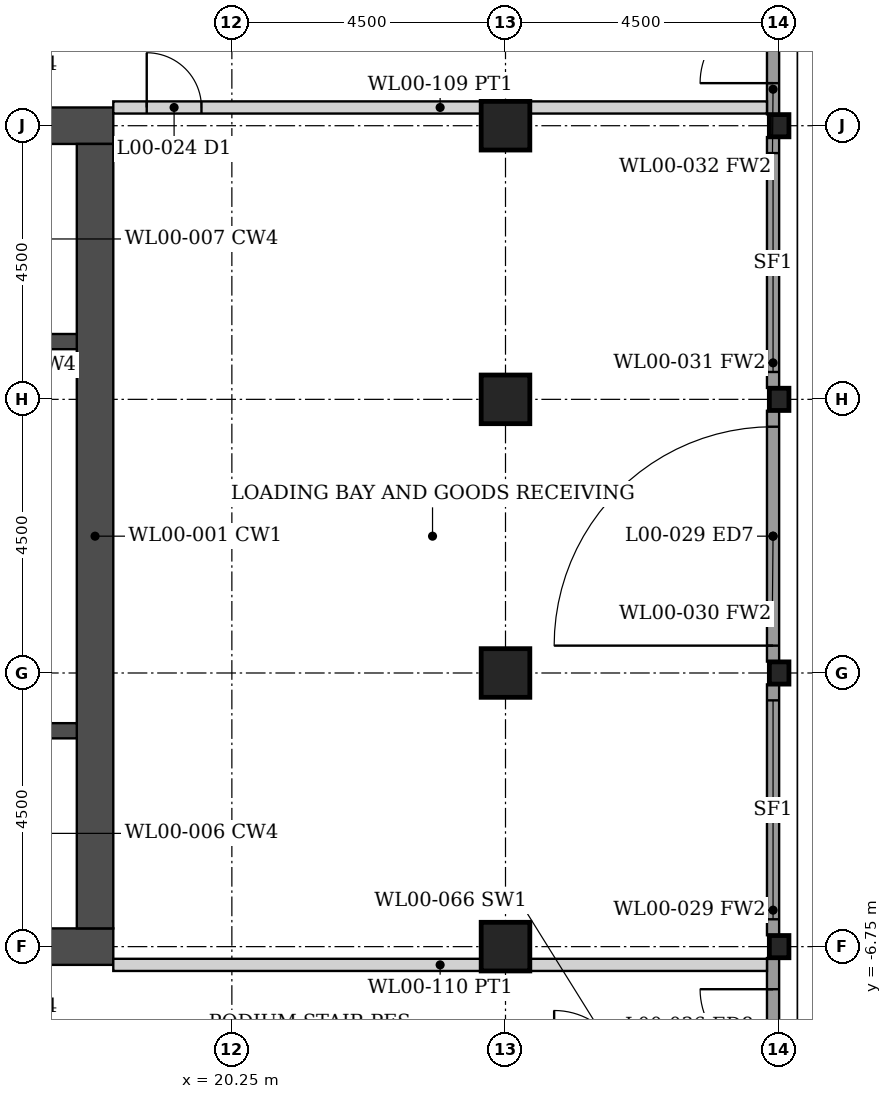
"""IFC4 building model, lengths in metres.
Left out: names, types, materials, properties, quantities, classifications, styles, units other than length and angle.
Written with IfcOpenShell. Run it as: python <this file> out.ifc"""

import sys

from ifc_helpers import new_model, si_unit, direction, frame, frame_2d, origin, origin_2d, place, context, subcontext, project, spatial, rectangle, hollow_rectangle, i_section, extrude, element, fill, save


model = new_model("IFC4")
c1 = context("Model", 3, precision=1e-05, world=origin(), true_north=direction((0.0, 1.0)))
c2 = subcontext(c1, "Body", "Model", "MODEL_VIEW")
j1 = project(units=[si_unit("LENGTHUNIT", "METRE"), si_unit("PLANEANGLEUNIT", "RADIAN")], contexts=[c1])
p1 = place(None, origin())
s1 = spatial("IfcSite", under=j1, at=p1, CompositionType="ELEMENT")
p2 = place(p1, origin())
s2 = spatial("IfcBuilding", under=s1, at=p2, CompositionType="ELEMENT")
p3 = place(p2, origin())
s3 = spatial("IfcBuildingStorey", under=s2, at=p3, CompositionType="ELEMENT", Elevation=0.0)
for number, where, z_axis, x_axis in (
    (1, (24.75, -6.75, -0.3), (0.0, 0.0, 1.0), (1.0, 0.0, 0.0)),
    (2, (24.75, -2.25, -0.3), (0.0, 0.0, 1.0), (1.0, 0.0, 0.0)),
    (3, (24.75, 2.25, -0.3), (0.0, 0.0, 1.0), (1.0, 0.0, 0.0)),
    (4, (24.75, 6.75, -0.3), (0.0, 0.0, 1.0), (1.0, 0.0, 0.0)),
):
    element("IfcColumn", number, at=place(p3, frame(where, z_axis=z_axis, x_axis=x_axis)), inside=s3, PredefinedType="COLUMN", context=c2, shape_type="SweptSolid", body=[
        extrude(hollow_rectangle(XDim=0.8, YDim=0.8, WallThickness=0.08, at=origin_2d()), origin(), (0.0, 0.0, 1.0), 6.3),
    ])
for number, where, z_axis, x_axis in (
    (5, (29.25, -6.75, -0.3), (0.0, 0.0, 1.0), (1.0, 0.0, 0.0)),
    (6, (29.25, -2.25, -0.3), (0.0, 0.0, 1.0), (1.0, 0.0, 0.0)),
    (7, (29.25, 2.25, -0.3), (0.0, 0.0, 1.0), (1.0, 0.0, 0.0)),
    (8, (29.25, 6.75, -0.3), (0.0, 0.0, 1.0), (1.0, 0.0, 0.0)),
):
    element("IfcColumn", number, at=place(p3, frame(where, z_axis=z_axis, x_axis=x_axis)), inside=s3, PredefinedType="COLUMN", context=c2, shape_type="SweptSolid", body=[
        extrude(i_section(OverallWidth=0.322, OverallDepth=0.365, WebThickness=0.027, FlangeThickness=0.044, FilletRadius=0.015, at=origin_2d()), origin(), (0.0, 0.0, 1.0), 6.3),
    ])
for number, where, z_axis, x_axis in (
    (9, (8.7, -6.75, 0.0), (0.0, 0.0, 1.0), (1.0, 0.0, 0.0)),
    (10, (8.7, 6.75, 0.0), (0.0, 0.0, 1.0), (1.0, 0.0, 0.0)),
):
    element("IfcWall", number, at=place(p3, frame(where, z_axis=z_axis, x_axis=x_axis)), inside=s3, PredefinedType="SHEAR", context=c2, shape_type="SweptSolid", body=[
        extrude(rectangle(XDim=9.6, YDim=0.6, at=frame_2d((4.8, 0.0))), origin(), (0.0, 0.0, 1.0), 6.0),
    ])
p4 = place(p3, frame((18.0, -6.45, 0.0), z_axis=(0.0, 0.0, 1.0), x_axis=(0.0, 1.0, 0.0)))
e11 = element("IfcWall", 11, at=p4, inside=s3, PredefinedType="SHEAR", context=c2, shape_type="SweptSolid", body=[
    extrude(rectangle(XDim=12.9, YDim=0.6, at=frame_2d((6.45, 0.0))), origin(), (0.0, 0.0, 1.0), 6.0),
])
p5 = place(p3, frame((9.3, -3.2, 0.0), z_axis=(0.0, 0.0, 1.0), x_axis=(1.0, 0.0, 0.0)))
e12 = element("IfcWall", 12, at=p5, inside=s3, PredefinedType="SHEAR", context=c2, shape_type="SweptSolid", body=[
    extrude(rectangle(XDim=8.4, YDim=0.25, at=frame_2d((4.2, 0.0))), origin(), (0.0, 0.0, 1.0), 6.0),
])
p6 = place(p5, frame((0.15, 0.0, 0.0)))
e13 = element("IfcOpeningElement", 13, at=p6, cuts=e12, PredefinedType="OPENING", context=c2, shape_type="SweptSolid", body=[
    extrude(rectangle(XDim=1.0, YDim=2.1, at=frame_2d((0.5, 1.05))), frame((0.0, 0.135, 0.0), z_axis=(0.0, -1.0, 0.0), x_axis=(1.0, 0.0, 0.0)), (0.0, 0.0, 1.0), 0.27),
])
p7 = place(p3, frame((9.3, 3.2, 0.0), z_axis=(0.0, 0.0, 1.0), x_axis=(1.0, 0.0, 0.0)))
e14 = element("IfcWall", 14, at=p7, inside=s3, PredefinedType="SHEAR", context=c2, shape_type="SweptSolid", body=[
    extrude(rectangle(XDim=8.4, YDim=0.25, at=frame_2d((4.2, 0.0))), origin(), (0.0, 0.0, 1.0), 6.0),
])
p8 = place(p3, frame((29.15, -11.062, 0.0), z_axis=(0.0, 0.0, 1.0), x_axis=(0.0, 1.0, 0.0)))
e15 = element("IfcWall", 15, at=p8, inside=s3, PredefinedType="SOLIDWALL", context=c2, shape_type="SweptSolid", body=[
    extrude(rectangle(XDim=4.125, YDim=0.2, at=frame_2d((2.062, 0.0))), origin(), (0.0, 0.0, 1.0), 5.133),
])
p9 = place(p8, frame((2.412, 0.0, 0.0)))
e16 = element("IfcOpeningElement", 16, at=p9, cuts=e15, PredefinedType="OPENING", context=c2, shape_type="SweptSolid", body=[
    extrude(rectangle(XDim=1.2, YDim=2.4, at=frame_2d((0.6, 1.2))), frame((0.0, 0.11, 0.0), z_axis=(0.0, -1.0, 0.0), x_axis=(1.0, 0.0, 0.0)), (0.0, 0.0, 1.0), 0.22),
])
p10 = place(p8, frame((0.012, 0.0, 0.15)))
e17 = element("IfcOpeningElement", 17, at=p10, cuts=e15, PredefinedType="OPENING", context=c2, shape_type="SweptSolid", body=[
    extrude(rectangle(XDim=1.6, YDim=4.833, at=frame_2d((0.8, 2.417))), frame((0.0, 0.11, 0.0), z_axis=(0.0, -1.0, 0.0), x_axis=(1.0, 0.0, 0.0)), (0.0, 0.0, 1.0), 0.22),
])
p11 = place(p3, frame((29.15, -6.562, 0.0), z_axis=(0.0, 0.0, 1.0), x_axis=(0.0, 1.0, 0.0)))
e18 = element("IfcWall", 18, at=p11, inside=s3, PredefinedType="SOLIDWALL", context=c2, shape_type="SweptSolid", body=[
    extrude(rectangle(XDim=4.125, YDim=0.2, at=frame_2d((2.062, 0.0))), origin(), (0.0, 0.0, 1.0), 5.133),
])
p12 = place(p11, frame((0.262, 0.0, 0.15)))
e19 = element("IfcOpeningElement", 19, at=p12, cuts=e18, PredefinedType="OPENING", context=c2, shape_type="SweptSolid", body=[
    extrude(rectangle(XDim=3.6, YDim=4.833, at=frame_2d((1.8, 2.417))), frame((0.0, 0.11, 0.0), z_axis=(0.0, -1.0, 0.0), x_axis=(1.0, 0.0, 0.0)), (0.0, 0.0, 1.0), 0.22),
])
p13 = place(p3, frame((29.15, -2.062, 0.0), z_axis=(0.0, 0.0, 1.0), x_axis=(0.0, 1.0, 0.0)))
e20 = element("IfcWall", 20, at=p13, inside=s3, PredefinedType="SOLIDWALL", context=c2, shape_type="SweptSolid", body=[
    extrude(rectangle(XDim=4.125, YDim=0.2, at=frame_2d((2.062, 0.0))), origin(), (0.0, 0.0, 1.0), 5.133),
])
p14 = place(p13, frame((0.262, 0.0, 0.0)))
e21 = element("IfcOpeningElement", 21, at=p14, cuts=e20, PredefinedType="OPENING", context=c2, shape_type="SweptSolid", body=[
    extrude(rectangle(XDim=3.6, YDim=4.5, at=frame_2d((1.8, 2.25))), frame((0.0, 0.11, 0.0), z_axis=(0.0, -1.0, 0.0), x_axis=(1.0, 0.0, 0.0)), (0.0, 0.0, 1.0), 0.22),
])
p15 = place(p3, frame((29.15, 2.438, 0.0), z_axis=(0.0, 0.0, 1.0), x_axis=(0.0, 1.0, 0.0)))
e22 = element("IfcWall", 22, at=p15, inside=s3, PredefinedType="SOLIDWALL", context=c2, shape_type="SweptSolid", body=[
    extrude(rectangle(XDim=4.125, YDim=0.2, at=frame_2d((2.062, 0.0))), origin(), (0.0, 0.0, 1.0), 5.133),
])
p16 = place(p15, frame((0.262, 0.0, 0.15)))
e23 = element("IfcOpeningElement", 23, at=p16, cuts=e22, PredefinedType="OPENING", context=c2, shape_type="SweptSolid", body=[
    extrude(rectangle(XDim=3.6, YDim=4.833, at=frame_2d((1.8, 2.417))), frame((0.0, 0.11, 0.0), z_axis=(0.0, -1.0, 0.0), x_axis=(1.0, 0.0, 0.0)), (0.0, 0.0, 1.0), 0.22),
])
p17 = place(p3, frame((29.15, 6.938, 0.0), z_axis=(0.0, 0.0, 1.0), x_axis=(0.0, 1.0, 0.0)))
e24 = element("IfcWall", 24, at=p17, inside=s3, PredefinedType="SOLIDWALL", context=c2, shape_type="SweptSolid", body=[
    extrude(rectangle(XDim=4.125, YDim=0.2, at=frame_2d((2.062, 0.0))), origin(), (0.0, 0.0, 1.0), 5.133),
])
p18 = place(p17, frame((0.512, 0.0, 0.0)))
e25 = element("IfcOpeningElement", 25, at=p18, cuts=e24, PredefinedType="OPENING", context=c2, shape_type="SweptSolid", body=[
    extrude(rectangle(XDim=1.2, YDim=2.4, at=frame_2d((0.6, 1.2))), frame((0.0, 0.11, 0.0), z_axis=(0.0, -1.0, 0.0), x_axis=(1.0, 0.0, 0.0)), (0.0, 0.0, 1.0), 0.22),
])
p19 = place(p17, frame((2.512, 0.0, 0.15)))
e26 = element("IfcOpeningElement", 26, at=p19, cuts=e24, PredefinedType="OPENING", context=c2, shape_type="SweptSolid", body=[
    extrude(rectangle(XDim=1.6, YDim=4.833, at=frame_2d((0.8, 2.417))), frame((0.0, 0.11, 0.0), z_axis=(0.0, -1.0, 0.0), x_axis=(1.0, 0.0, 0.0)), (0.0, 0.0, 1.0), 0.22),
])
p20 = place(p3, frame((18.3, 7.05, 0.0), z_axis=(0.0, 0.0, 1.0), x_axis=(1.0, 0.0, 0.0)))
e27 = element("IfcWall", 27, at=p20, inside=s3, PredefinedType="PARTITIONING", context=c2, shape_type="SweptSolid", body=[
    extrude(rectangle(XDim=10.75, YDim=0.2, at=frame_2d((5.375, 0.0))), origin(), (0.0, 0.0, 1.0), 4.829),
])
p21 = place(p20, frame((0.55, 0.0, 0.0)))
e28 = element("IfcOpeningElement", 28, at=p21, cuts=e27, PredefinedType="OPENING", context=c2, shape_type="SweptSolid", body=[
    extrude(rectangle(XDim=0.9, YDim=2.1, at=frame_2d((0.45, 1.05))), frame((0.0, 0.11, 0.0), z_axis=(0.0, -1.0, 0.0), x_axis=(1.0, 0.0, 0.0)), (0.0, 0.0, 1.0), 0.22),
])
p22 = place(p3, frame((18.3, -7.05, 0.0), z_axis=(0.0, 0.0, 1.0), x_axis=(1.0, 0.0, 0.0)))
e29 = element("IfcWall", 29, at=p22, inside=s3, PredefinedType="PARTITIONING", context=c2, shape_type="SweptSolid", body=[
    extrude(rectangle(XDim=10.75, YDim=0.2, at=frame_2d((5.375, 0.0))), origin(), (0.0, 0.0, 1.0), 4.829),
])
p23 = place(p9, origin())
e30 = element("IfcDoor", 30, at=p23, inside=s3, OperationType="SINGLE_SWING_RIGHT", PredefinedType="DOOR", context=c2, shape_type="SweptSolid", body=[
    extrude(rectangle(XDim=1.2, YDim=2.4, at=frame_2d((0.6, 1.2))), frame((0.0, 0.025, 0.0), z_axis=(0.0, -1.0, 0.0), x_axis=(1.0, 0.0, 0.0)), (0.0, 0.0, 1.0), 0.05),
])
fill(e16, e30)
p24 = place(p12, origin())
e31 = element("IfcWindow", 31, at=p24, inside=s3, PartitioningType="SINGLE_PANEL", PredefinedType="WINDOW", context=c2, shape_type="SweptSolid", body=[
    extrude(rectangle(XDim=3.6, YDim=4.833, at=frame_2d((1.8, 2.417))), frame((0.0, 0.03, 0.0), z_axis=(0.0, -1.0, 0.0), x_axis=(1.0, 0.0, 0.0)), (0.0, 0.0, 1.0), 0.06),
])
fill(e19, e31)
p25 = place(p14, origin())
e32 = element("IfcDoor", 32, at=p25, inside=s3, OperationType="ROLLINGUP", PredefinedType="DOOR", context=c2, shape_type="SweptSolid", body=[
    extrude(rectangle(XDim=3.6, YDim=4.5, at=frame_2d((1.8, 2.25))), frame((0.0, 0.025, 0.0), z_axis=(0.0, -1.0, 0.0), x_axis=(1.0, 0.0, 0.0)), (0.0, 0.0, 1.0), 0.05),
])
fill(e21, e32)
p26 = place(p16, origin())
e33 = element("IfcWindow", 33, at=p26, inside=s3, PartitioningType="SINGLE_PANEL", PredefinedType="WINDOW", context=c2, shape_type="SweptSolid", body=[
    extrude(rectangle(XDim=3.6, YDim=4.833, at=frame_2d((1.8, 2.417))), frame((0.0, 0.03, 0.0), z_axis=(0.0, -1.0, 0.0), x_axis=(1.0, 0.0, 0.0)), (0.0, 0.0, 1.0), 0.06),
])
fill(e23, e33)
p27 = place(p18, origin())
e34 = element("IfcDoor", 34, at=p27, inside=s3, OperationType="SINGLE_SWING_LEFT", PredefinedType="DOOR", context=c2, shape_type="SweptSolid", body=[
    extrude(rectangle(XDim=1.2, YDim=2.4, at=frame_2d((0.6, 1.2))), frame((0.0, 0.025, 0.0), z_axis=(0.0, -1.0, 0.0), x_axis=(1.0, 0.0, 0.0)), (0.0, 0.0, 1.0), 0.05),
])
fill(e25, e34)
p28 = place(p21, origin())
e35 = element("IfcDoor", 35, at=p28, inside=s3, OperationType="SINGLE_SWING_LEFT", PredefinedType="DOOR", context=c2, shape_type="SweptSolid", body=[
    extrude(rectangle(XDim=0.9, YDim=2.1, at=frame_2d((0.45, 1.05))), frame((0.0, 0.025, 0.0), z_axis=(0.0, -1.0, 0.0), x_axis=(1.0, 0.0, 0.0)), (0.0, 0.0, 1.0), 0.05),
])
fill(e28, e35)
save(model, sys.argv[1])
